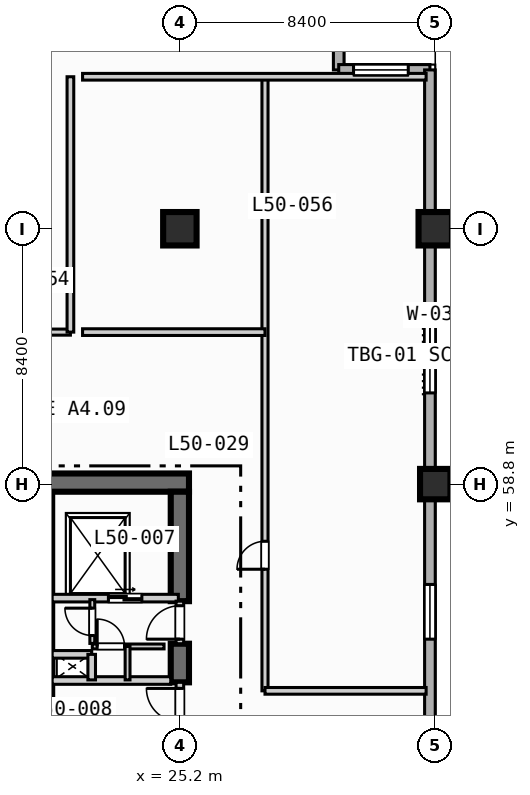
"""IFC4 building model, lengths in metres.
Left out: names, types, materials, properties, quantities, classifications, styles, units other than length and angle.
Written with IfcOpenShell. Run it as: python <this file> out.ifc"""

import sys

from ifc_helpers import new_model, si_unit, direction, frame, frame_2d, origin, origin_2d, place, context, subcontext, project, spatial, rectangle, extrude, element, fill, save


model = new_model("IFC4")
c1 = context("Model", 3, precision=1e-05, world=origin(), true_north=direction((0.0, 1.0)))
c2 = subcontext(c1, "Body", "Model", "MODEL_VIEW")
j1 = project(units=[si_unit("LENGTHUNIT", "METRE"), si_unit("PLANEANGLEUNIT", "RADIAN")], contexts=[c1])
p1 = place(None, origin())
s1 = spatial("IfcSite", under=j1, at=p1, CompositionType="ELEMENT")
p2 = place(p1, origin())
s2 = spatial("IfcBuilding", under=s1, at=p2, CompositionType="ELEMENT")
p3 = place(p2, frame((0.0, 0.0, 205.0)))
s3 = spatial("IfcBuildingStorey", under=s2, at=p3, CompositionType="ELEMENT", Elevation=205.0)
p4 = place(p3, frame((20.5, 58.85, 0.0), z_axis=(0.0, 0.0, 1.0), x_axis=(1.0, 0.0, 0.0)))
e1 = element("IfcWall", 1, at=p4, inside=s3, PredefinedType="SHEAR", context=c2, shape_type="SweptSolid", body=[
    extrude(rectangle(XDim=5.0, YDim=0.6, at=frame_2d((2.5, 0.0))), origin(), (0.0, 0.0, 1.0), 3.47),
])
p5 = place(p3, frame((25.2, 52.28, 0.0), z_axis=(0.0, 0.0, 1.0), x_axis=(0.0, 1.0, 0.0)))
e2 = element("IfcWall", 2, at=p5, inside=s3, PredefinedType="SHEAR", context=c2, shape_type="SweptSolid", body=[
    extrude(rectangle(XDim=1.27, YDim=0.6, at=frame_2d((0.635, 0.0))), origin(), (0.0, 0.0, 1.0), 3.47),
])
p6 = place(p3, frame((25.2, 54.95, 0.0), z_axis=(0.0, 0.0, 1.0), x_axis=(0.0, 1.0, 0.0)))
e3 = element("IfcWall", 3, at=p6, inside=s3, PredefinedType="SHEAR", context=c2, shape_type="SweptSolid", body=[
    extrude(rectangle(XDim=3.6, YDim=0.6, at=frame_2d((1.8, 0.0))), origin(), (0.0, 0.0, 1.0), 3.47),
])
p7 = place(p3, frame((25.2, 67.2, 0.0), z_axis=(0.0, 0.0, 1.0), x_axis=(1.0, 0.0, 0.0)))
e4 = element("IfcColumn", 4, at=p7, inside=s3, PredefinedType="COLUMN", context=c2, shape_type="SweptSolid", body=[
    extrude(rectangle(XDim=1.1, YDim=1.1, at=origin_2d()), origin(), (0.0, 0.0, 1.0), 3.7),
])
p8 = place(p3, frame((33.6, 58.8, 0.0), z_axis=(0.0, 0.0, 1.0), x_axis=(1.0, 0.0, 0.0)))
e5 = element("IfcColumn", 5, at=p8, inside=s3, PredefinedType="COLUMN", context=c2, shape_type="SweptSolid", body=[
    extrude(rectangle(XDim=1.0, YDim=1.0, at=origin_2d()), origin(), (0.0, 0.0, 1.0), 3.7),
])
p9 = place(p3, frame((33.6, 67.2, 0.0), z_axis=(0.0, 0.0, 1.0), x_axis=(1.0, 0.0, 0.0)))
e6 = element("IfcColumn", 6, at=p9, inside=s3, PredefinedType="COLUMN", context=c2, shape_type="SweptSolid", body=[
    extrude(rectangle(XDim=1.1, YDim=1.1, at=origin_2d()), origin(), (0.0, 0.0, 1.0), 3.7),
])
p10 = place(p3, frame((30.425, 75.425, 0.0), z_axis=(0.0, 0.0, 1.0), x_axis=(0.0, -1.0, 0.0)))
e7 = element("IfcWall", 7, at=p10, inside=s3, PredefinedType="STANDARD", context=c2, shape_type="SweptSolid", body=[
    extrude(rectangle(XDim=3.0, YDim=0.35, at=frame_2d((1.5, 0.0))), origin(), (0.0, 0.0, 1.0), 3.47),
])
p11 = place(p3, frame((30.425, 72.425, 0.0), z_axis=(0.0, 0.0, 1.0), x_axis=(1.0, 0.0, 0.0)))
e8 = element("IfcWall", 8, at=p11, inside=s3, PredefinedType="STANDARD", context=c2, shape_type="SweptSolid", body=[
    extrude(rectangle(XDim=3.0, YDim=0.35, at=frame_2d((1.5, 0.0))), origin(), (0.0, 0.0, 1.0), 3.47),
])
p12 = place(p11, frame((0.488, 0.0, 0.85)))
e9 = element("IfcOpeningElement", 9, at=p12, cuts=e8, PredefinedType="OPENING", context=c2, shape_type="SweptSolid", body=[
    extrude(rectangle(XDim=1.8, YDim=1.8, at=frame_2d((0.9, 0.9))), frame((0.0, 0.185, 0.0), z_axis=(0.0, -1.0, 0.0), x_axis=(1.0, 0.0, 0.0)), (0.0, 0.0, 1.0), 0.37),
])
p13 = place(p3, frame((33.425, 72.425, 0.0), z_axis=(0.0, 0.0, 1.0), x_axis=(0.0, -1.0, 0.0)))
e10 = element("IfcWall", 10, at=p13, inside=s3, PredefinedType="STANDARD", context=c2, shape_type="SweptSolid", body=[
    extrude(rectangle(XDim=39.0, YDim=0.35, at=frame_2d((19.5, 0.0))), origin(), (0.0, 0.0, 1.0), 3.47),
])
p14 = place(p13, frame((33.725, 0.0, 0.85)))
e11 = element("IfcOpeningElement", 11, at=p14, cuts=e10, PredefinedType="OPENING", context=c2, shape_type="SweptSolid", body=[
    extrude(rectangle(XDim=1.8, YDim=1.8, at=frame_2d((0.9, 0.9))), frame((0.0, 0.185, 0.0), z_axis=(0.0, -1.0, 0.0), x_axis=(1.0, 0.0, 0.0)), (0.0, 0.0, 1.0), 0.37),
])
p15 = place(p13, frame((16.925, 0.0, 0.85)))
e12 = element("IfcOpeningElement", 12, at=p15, cuts=e10, PredefinedType="OPENING", context=c2, shape_type="SweptSolid", body=[
    extrude(rectangle(XDim=1.8, YDim=1.8, at=frame_2d((0.9, 0.9))), frame((0.0, 0.185, 0.0), z_axis=(0.0, -1.0, 0.0), x_axis=(1.0, 0.0, 0.0)), (0.0, 0.0, 1.0), 0.37),
])
p16 = place(p13, frame((8.225, 0.0, 0.85)))
e13 = element("IfcOpeningElement", 13, at=p16, cuts=e10, PredefinedType="OPENING", context=c2, shape_type="SweptSolid", body=[
    extrude(rectangle(XDim=2.4, YDim=1.95, at=frame_2d((1.2, 0.975))), frame((0.0, 0.185, 0.0), z_axis=(0.0, -1.0, 0.0), x_axis=(1.0, 0.0, 0.0)), (0.0, 0.0, 1.0), 0.37),
])
p17 = place(p3, frame((25.2, 50.8, 0.0), z_axis=(0.0, 0.0, 1.0), x_axis=(0.0, 1.0, 0.0)))
e14 = element("IfcWall", 14, at=p17, inside=s3, PredefinedType="SOLIDWALL", context=c2, shape_type="SweptSolid", body=[
    extrude(rectangle(XDim=1.48, YDim=0.25, at=frame_2d((0.74, 0.0))), origin(), (0.0, 0.0, 1.0), 3.47),
])
p18 = place(p17, frame((0.18, 0.0, 0.0)))
e15 = element("IfcOpeningElement", 15, at=p18, cuts=e14, PredefinedType="OPENING", context=c2, shape_type="SweptSolid", body=[
    extrude(rectangle(XDim=1.1, YDim=2.15, at=frame_2d((0.55, 1.075))), frame((0.0, 0.135, 0.0), z_axis=(0.0, -1.0, 0.0), x_axis=(1.0, 0.0, 0.0)), (0.0, 0.0, 1.0), 0.27),
])
p19 = place(p3, frame((21.0, 52.34, 0.0), z_axis=(0.0, 0.0, 1.0), x_axis=(1.0, 0.0, 0.0)))
e16 = element("IfcWall", 16, at=p19, inside=s3, PredefinedType="SOLIDWALL", context=c2, shape_type="SweptSolid", body=[
    extrude(rectangle(XDim=3.9, YDim=0.25, at=frame_2d((1.95, 0.0))), origin(), (0.0, 0.0, 1.0), 3.47),
])
p20 = place(p3, frame((21.0, 55.05, 0.0), z_axis=(0.0, 0.0, 1.0), x_axis=(1.0, 0.0, 0.0)))
e17 = element("IfcWall", 17, at=p20, inside=s3, PredefinedType="SOLIDWALL", context=c2, shape_type="SweptSolid", body=[
    extrude(rectangle(XDim=4.15, YDim=0.25, at=frame_2d((2.075, 0.0))), origin(), (0.0, 0.0, 1.0), 3.47),
])
p21 = place(p20, frame((1.85, 0.0, 0.0)))
e18 = element("IfcOpeningElement", 18, at=p21, cuts=e17, PredefinedType="OPENING", context=c2, shape_type="SweptSolid", body=[
    extrude(rectangle(XDim=1.1, YDim=2.15, at=frame_2d((0.55, 1.075))), frame((0.0, 0.135, 0.0), z_axis=(0.0, -1.0, 0.0), x_axis=(1.0, 0.0, 0.0)), (0.0, 0.0, 1.0), 0.27),
])
p22 = place(p3, frame((25.2, 53.55, 0.0), z_axis=(0.0, 0.0, 1.0), x_axis=(0.0, 1.0, 0.0)))
e19 = element("IfcWall", 19, at=p22, inside=s3, PredefinedType="SOLIDWALL", context=c2, shape_type="SweptSolid", body=[
    extrude(rectangle(XDim=1.4, YDim=0.25, at=frame_2d((0.7, 0.0))), origin(), (0.0, 0.0, 1.0), 3.47),
])
p23 = place(p22, frame((0.15, 0.0, 0.0)))
e20 = element("IfcOpeningElement", 20, at=p23, cuts=e19, PredefinedType="OPENING", context=c2, shape_type="SweptSolid", body=[
    extrude(rectangle(XDim=1.1, YDim=2.15, at=frame_2d((0.55, 1.075))), frame((0.0, 0.135, 0.0), z_axis=(0.0, -1.0, 0.0), x_axis=(1.0, 0.0, 0.0)), (0.0, 0.0, 1.0), 0.27),
])
p24 = place(p3, frame((21.0, 53.2, 0.0), z_axis=(0.0, 0.0, 1.0), x_axis=(1.0, 0.0, 0.0)))
e21 = element("IfcWall", 21, at=p24, inside=s3, PredefinedType="SOLIDWALL", context=c2, shape_type="SweptSolid", body=[
    extrude(rectangle(XDim=1.3, YDim=0.25, at=frame_2d((0.65, 0.0))), origin(), (0.0, 0.0, 1.0), 3.47),
])
p25 = place(p3, frame((22.3, 52.36, 0.0), z_axis=(0.0, 0.0, 1.0), x_axis=(0.0, 1.0, 0.0)))
e22 = element("IfcWall", 22, at=p25, inside=s3, PredefinedType="SOLIDWALL", context=c2, shape_type="SweptSolid", body=[
    extrude(rectangle(XDim=0.84, YDim=0.25, at=frame_2d((0.42, 0.0))), origin(), (0.0, 0.0, 1.0), 3.47),
])
p26 = place(p3, frame((22.32, 53.56, 0.0), z_axis=(0.0, 0.0, 1.0), x_axis=(0.0, 1.0, 0.0)))
e23 = element("IfcWall", 23, at=p26, inside=s3, PredefinedType="PARTITIONING", context=c2, shape_type="SweptSolid", body=[
    extrude(rectangle(XDim=1.44, YDim=0.16, at=frame_2d((0.72, 0.0))), origin(), (0.0, 0.0, 1.0), 3.47),
])
p27 = place(p26, frame((0.26, 0.0, 0.0)))
e24 = element("IfcOpeningElement", 24, at=p27, cuts=e23, PredefinedType="OPENING", context=c2, shape_type="SweptSolid", body=[
    extrude(rectangle(XDim=0.9, YDim=2.1, at=frame_2d((0.45, 1.05))), frame((0.0, 0.09, 0.0), z_axis=(0.0, -1.0, 0.0), x_axis=(1.0, 0.0, 0.0)), (0.0, 0.0, 1.0), 0.18),
])
p28 = place(p3, frame((22.32, 53.46, 0.0), z_axis=(0.0, 0.0, 1.0), x_axis=(1.0, 0.0, 0.0)))
e25 = element("IfcWall", 25, at=p28, inside=s3, PredefinedType="PARTITIONING", context=c2, shape_type="SweptSolid", body=[
    extrude(rectangle(XDim=2.36, YDim=0.16, at=frame_2d((1.18, 0.0))), origin(), (0.0, 0.0, 1.0), 3.47),
])
p29 = place(p28, frame((0.16, 0.0, 0.0)))
e26 = element("IfcOpeningElement", 26, at=p29, cuts=e25, PredefinedType="OPENING", context=c2, shape_type="SweptSolid", body=[
    extrude(rectangle(XDim=0.9, YDim=2.1, at=frame_2d((0.45, 1.05))), frame((0.0, 0.09, 0.0), z_axis=(0.0, -1.0, 0.0), x_axis=(1.0, 0.0, 0.0)), (0.0, 0.0, 1.0), 0.18),
])
p30 = place(p3, frame((23.48, 52.36, 0.0), z_axis=(0.0, 0.0, 1.0), x_axis=(0.0, 1.0, 0.0)))
e27 = element("IfcWall", 27, at=p30, inside=s3, PredefinedType="PARTITIONING", context=c2, shape_type="SweptSolid", body=[
    extrude(rectangle(XDim=1.1, YDim=0.16, at=frame_2d((0.55, 0.0))), origin(), (0.0, 0.0, 1.0), 3.47),
])
p31 = place(p3, frame((3.4, 63.8, 0.0), z_axis=(0.0, 0.0, 1.0), x_axis=(1.0, 0.0, 0.0)))
e28 = element("IfcWall", 28, at=p31, inside=s3, PredefinedType="PARTITIONING", context=c2, shape_type="SweptSolid", body=[
    extrude(rectangle(XDim=18.2, YDim=0.2, at=frame_2d((9.1, 0.0))), origin(), (0.0, 0.0, 1.0), 3.47),
])
p32 = place(p31, frame((4.05, 0.0, 0.0)))
e29 = element("IfcOpeningElement", 29, at=p32, cuts=e28, PredefinedType="OPENING", context=c2, shape_type="SweptSolid", body=[
    extrude(rectangle(XDim=1.0, YDim=2.15, at=frame_2d((0.5, 1.075))), frame((0.0, 0.11, 0.0), z_axis=(0.0, -1.0, 0.0), x_axis=(1.0, 0.0, 0.0)), (0.0, 0.0, 1.0), 0.22),
])
p33 = place(p3, frame((21.6, 63.8, 0.0), z_axis=(0.0, 0.0, 1.0), x_axis=(0.0, 1.0, 0.0)))
e30 = element("IfcWall", 30, at=p33, inside=s3, PredefinedType="PARTITIONING", context=c2, shape_type="SweptSolid", body=[
    extrude(rectangle(XDim=8.4, YDim=0.22, at=frame_2d((4.2, 0.0))), origin(), (0.0, 0.0, 1.0), 3.47),
])
p34 = place(p3, frame((28.0, 52.0, 0.0), z_axis=(0.0, 0.0, 1.0), x_axis=(0.0, 1.0, 0.0)))
e31 = element("IfcWall", 31, at=p34, inside=s3, PredefinedType="PARTITIONING", context=c2, shape_type="SweptSolid", body=[
    extrude(rectangle(XDim=20.2, YDim=0.2, at=frame_2d((10.1, 0.0))), origin(), (0.0, 0.0, 1.0), 3.47),
])
p35 = place(p34, frame((4.0, 0.0, 0.0)))
e32 = element("IfcOpeningElement", 32, at=p35, cuts=e31, PredefinedType="OPENING", context=c2, shape_type="SweptSolid", body=[
    extrude(rectangle(XDim=0.92, YDim=2.1, at=frame_2d((0.46, 1.05))), frame((0.0, 0.11, 0.0), z_axis=(0.0, -1.0, 0.0), x_axis=(1.0, 0.0, 0.0)), (0.0, 0.0, 1.0), 0.22),
])
p36 = place(p3, frame((28.0, 52.0, 0.0), z_axis=(0.0, 0.0, 1.0), x_axis=(1.0, 0.0, 0.0)))
e33 = element("IfcWall", 33, at=p36, inside=s3, PredefinedType="PARTITIONING", context=c2, shape_type="SweptSolid", body=[
    extrude(rectangle(XDim=5.3, YDim=0.22, at=frame_2d((2.65, 0.0))), origin(), (0.0, 0.0, 1.0), 3.47),
])
p37 = place(p3, frame((22.0, 72.2, 0.0), z_axis=(0.0, 0.0, 1.0), x_axis=(1.0, 0.0, 0.0)))
e34 = element("IfcWall", 34, at=p37, inside=s3, PredefinedType="PARTITIONING", context=c2, shape_type="SweptSolid", body=[
    extrude(rectangle(XDim=11.3, YDim=0.22, at=frame_2d((5.65, 0.0))), origin(), (0.0, 0.0, 1.0), 3.47),
])
p38 = place(p3, frame((22.0, 63.8, 0.0), z_axis=(0.0, 0.0, 1.0), x_axis=(1.0, 0.0, 0.0)))
e35 = element("IfcWall", 35, at=p38, inside=s3, PredefinedType="PARTITIONING", context=c2, shape_type="SweptSolid", body=[
    extrude(rectangle(XDim=6.0, YDim=0.22, at=frame_2d((3.0, 0.0))), origin(), (0.0, 0.0, 1.0), 3.47),
])
p39 = place(p12, origin())
e36 = element("IfcWindow", 36, at=p39, inside=s3, PartitioningType="SINGLE_PANEL", PredefinedType="WINDOW", context=c2, shape_type="SweptSolid", body=[
    extrude(rectangle(XDim=1.8, YDim=1.8, at=frame_2d((0.9, 0.9))), frame((0.0, 0.03, 0.0), z_axis=(0.0, -1.0, 0.0), x_axis=(1.0, 0.0, 0.0)), (0.0, 0.0, 1.0), 0.06),
])
fill(e9, e36)
p40 = place(p15, origin())
e37 = element("IfcWindow", 37, at=p40, inside=s3, PartitioningType="SINGLE_PANEL", PredefinedType="WINDOW", context=c2, shape_type="SweptSolid", body=[
    extrude(rectangle(XDim=1.8, YDim=1.8, at=frame_2d((0.9, 0.9))), frame((0.0, 0.03, 0.0), z_axis=(0.0, -1.0, 0.0), x_axis=(1.0, 0.0, 0.0)), (0.0, 0.0, 1.0), 0.06),
])
fill(e12, e37)
p41 = place(p16, origin())
e38 = element("IfcWindow", 38, at=p41, inside=s3, PartitioningType="SINGLE_PANEL", PredefinedType="WINDOW", context=c2, shape_type="SweptSolid", body=[
    extrude(rectangle(XDim=2.4, YDim=1.95, at=frame_2d((1.2, 0.975))), frame((0.0, 0.03, 0.0), z_axis=(0.0, -1.0, 0.0), x_axis=(1.0, 0.0, 0.0)), (0.0, 0.0, 1.0), 0.06),
])
fill(e13, e38)
p42 = place(p18, origin())
e39 = element("IfcDoor", 39, at=p42, inside=s3, OperationType="SINGLE_SWING_RIGHT", PredefinedType="DOOR", context=c2, shape_type="SweptSolid", body=[
    extrude(rectangle(XDim=1.1, YDim=2.15, at=frame_2d((0.55, 1.075))), frame((0.0, 0.025, 0.0), z_axis=(0.0, -1.0, 0.0), x_axis=(1.0, 0.0, 0.0)), (0.0, 0.0, 1.0), 0.05),
])
fill(e15, e39)
p43 = place(p21, origin())
e40 = element("IfcDoor", 40, at=p43, inside=s3, OperationType="SLIDING_TO_LEFT", PredefinedType="DOOR", context=c2, shape_type="SweptSolid", body=[
    extrude(rectangle(XDim=1.1, YDim=2.15, at=frame_2d((0.55, 1.075))), frame((0.0, 0.025, 0.0), z_axis=(0.0, -1.0, 0.0), x_axis=(1.0, 0.0, 0.0)), (0.0, 0.0, 1.0), 0.05),
])
fill(e18, e40)
p44 = place(p23, origin())
e41 = element("IfcDoor", 41, at=p44, inside=s3, OperationType="SINGLE_SWING_LEFT", PredefinedType="DOOR", context=c2, shape_type="SweptSolid", body=[
    extrude(rectangle(XDim=1.1, YDim=2.15, at=frame_2d((0.55, 1.075))), frame((0.0, 0.025, 0.0), z_axis=(0.0, -1.0, 0.0), x_axis=(1.0, 0.0, 0.0)), (0.0, 0.0, 1.0), 0.05),
])
fill(e20, e41)
p45 = place(p27, origin())
e42 = element("IfcDoor", 42, at=p45, inside=s3, OperationType="SINGLE_SWING_RIGHT", PredefinedType="DOOR", context=c2, shape_type="SweptSolid", body=[
    extrude(rectangle(XDim=0.9, YDim=2.1, at=frame_2d((0.45, 1.05))), frame((0.0, 0.025, 0.0), z_axis=(0.0, -1.0, 0.0), x_axis=(1.0, 0.0, 0.0)), (0.0, 0.0, 1.0), 0.05),
])
fill(e24, e42)
p46 = place(p29, origin())
e43 = element("IfcDoor", 43, at=p46, inside=s3, OperationType="SINGLE_SWING_LEFT", PredefinedType="DOOR", context=c2, shape_type="SweptSolid", body=[
    extrude(rectangle(XDim=0.9, YDim=2.1, at=frame_2d((0.45, 1.05))), frame((0.0, 0.025, 0.0), z_axis=(0.0, -1.0, 0.0), x_axis=(1.0, 0.0, 0.0)), (0.0, 0.0, 1.0), 0.05),
])
fill(e26, e43)
p47 = place(p35, origin())
e44 = element("IfcDoor", 44, at=p47, inside=s3, OperationType="SINGLE_SWING_LEFT", PredefinedType="DOOR", context=c2, shape_type="SweptSolid", body=[
    extrude(rectangle(XDim=0.92, YDim=2.1, at=frame_2d((0.46, 1.05))), frame((0.0, 0.025, 0.0), z_axis=(0.0, -1.0, 0.0), x_axis=(1.0, 0.0, 0.0)), (0.0, 0.0, 1.0), 0.05),
])
fill(e32, e44)
save(model, sys.argv[1])
